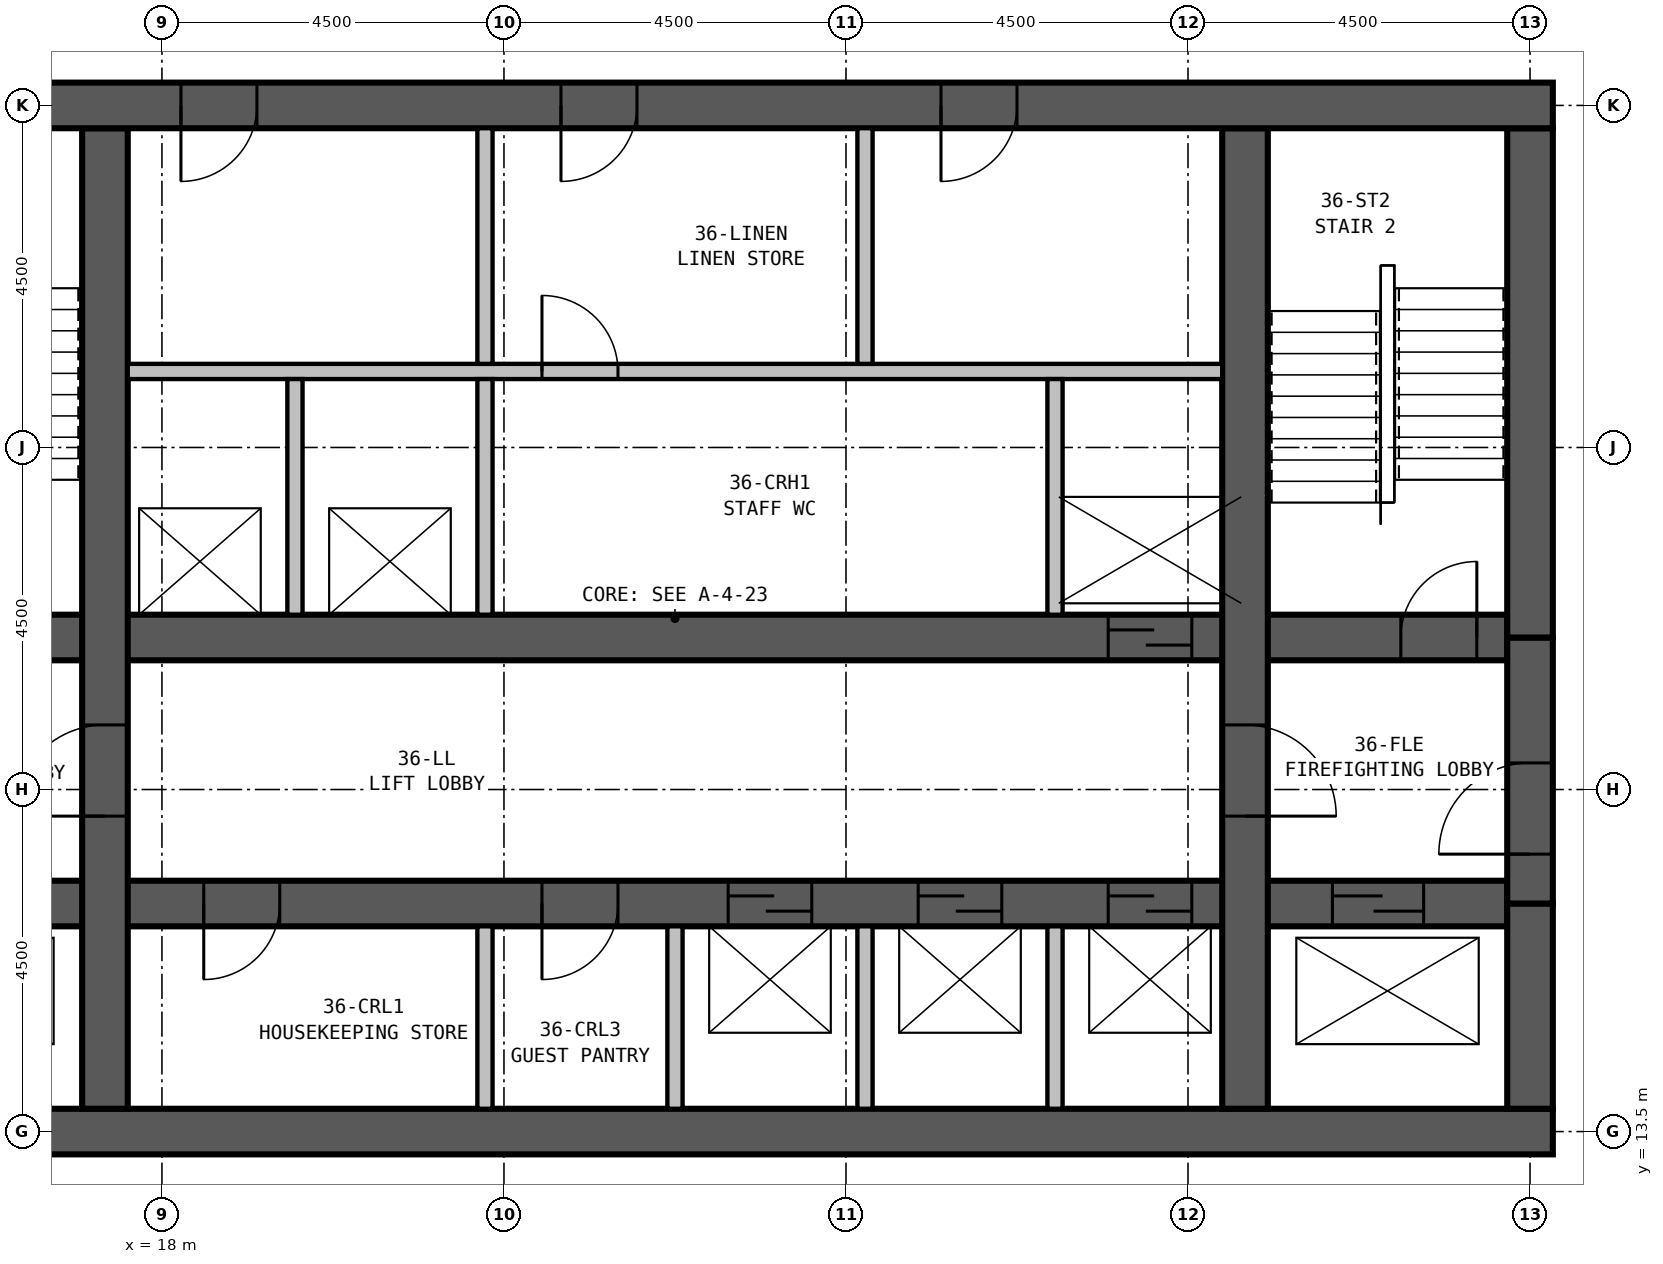
"""IFC4 building model, lengths in metres.
Left out: names, types, materials, properties, quantities, classifications, styles, units other than length and angle.
Written with IfcOpenShell. Run it as: python <this file> out.ifc"""

import sys

from ifc_helpers import new_model, si_unit, direction, frame, frame_2d, origin, place, context, subcontext, project, spatial, rectangle, extrude, element, fill, save


model = new_model("IFC4")
c1 = context("Model", 3, precision=1e-05, world=origin(), true_north=direction((0.0, 1.0)))
c2 = subcontext(c1, "Body", "Model", "MODEL_VIEW")
j1 = project(units=[si_unit("LENGTHUNIT", "METRE"), si_unit("PLANEANGLEUNIT", "RADIAN")], contexts=[c1])
p1 = place(None, origin())
s1 = spatial("IfcSite", under=j1, at=p1, CompositionType="ELEMENT")
p2 = place(p1, origin())
s2 = spatial("IfcBuilding", under=s1, at=p2, CompositionType="ELEMENT")
p3 = place(p2, frame((0.0, 0.0, 138.9)))
s3 = spatial("IfcBuildingStorey", under=s2, at=p3, CompositionType="ELEMENT", Elevation=138.9)
p4 = place(p3, frame((13.2, 13.5, 0.0), z_axis=(0.0, 0.0, 1.0), x_axis=(1.0, 0.0, 0.0)))
e1 = element("IfcWall", 1, at=p4, inside=s3, PredefinedType="SHEAR", context=c2, shape_type="SweptSolid", body=[
    extrude(rectangle(XDim=23.1, YDim=0.6, at=frame_2d((11.55, 0.0))), origin(), (0.0, 0.0, 1.0), 3.5),
])
p5 = place(p3, frame((36.3, 27.0, 0.0), z_axis=(0.0, 0.0, 1.0), x_axis=(-1.0, 0.0, 0.0)))
e2 = element("IfcWall", 2, at=p5, inside=s3, PredefinedType="SHEAR", context=c2, shape_type="SweptSolid", body=[
    extrude(rectangle(XDim=23.1, YDim=0.6, at=frame_2d((11.55, 0.0))), origin(), (0.0, 0.0, 1.0), 3.5),
])
p6 = place(p5, frame((17.05, 0.0, 0.0)))
e3 = element("IfcOpeningElement", 3, at=p6, cuts=e2, PredefinedType="OPENING", context=c2, shape_type="SweptSolid", body=[
    extrude(rectangle(XDim=1.0, YDim=2.1, at=frame_2d((0.5, 1.05))), frame((0.0, 0.31, 0.0), z_axis=(0.0, -1.0, 0.0), x_axis=(1.0, 0.0, 0.0)), (0.0, 0.0, 1.0), 0.62),
])
p7 = place(p5, frame((12.05, 0.0, 0.0)))
e4 = element("IfcOpeningElement", 4, at=p7, cuts=e2, PredefinedType="OPENING", context=c2, shape_type="SweptSolid", body=[
    extrude(rectangle(XDim=1.0, YDim=2.1, at=frame_2d((0.5, 1.05))), frame((0.0, 0.31, 0.0), z_axis=(0.0, -1.0, 0.0), x_axis=(1.0, 0.0, 0.0)), (0.0, 0.0, 1.0), 0.62),
])
p8 = place(p5, frame((7.05, 0.0, 0.0)))
e5 = element("IfcOpeningElement", 5, at=p8, cuts=e2, PredefinedType="OPENING", context=c2, shape_type="SweptSolid", body=[
    extrude(rectangle(XDim=1.0, YDim=2.1, at=frame_2d((0.5, 1.05))), frame((0.0, 0.31, 0.0), z_axis=(0.0, -1.0, 0.0), x_axis=(1.0, 0.0, 0.0)), (0.0, 0.0, 1.0), 0.62),
])
p9 = place(p3, frame((17.25, 13.8, 0.0), z_axis=(0.0, 0.0, 1.0), x_axis=(0.0, 1.0, 0.0)))
e6 = element("IfcWall", 6, at=p9, inside=s3, PredefinedType="SHEAR", context=c2, shape_type="SweptSolid", body=[
    extrude(rectangle(XDim=12.9, YDim=0.6, at=frame_2d((6.45, 0.0))), origin(), (0.0, 0.0, 1.0), 3.5),
])
p10 = place(p9, frame((3.85, 0.0, 0.0)))
e7 = element("IfcOpeningElement", 7, at=p10, cuts=e6, PredefinedType="OPENING", context=c2, shape_type="SweptSolid", body=[
    extrude(rectangle(XDim=1.2, YDim=2.1, at=frame_2d((0.6, 1.05))), frame((0.0, 0.31, 0.0), z_axis=(0.0, -1.0, 0.0), x_axis=(1.0, 0.0, 0.0)), (0.0, 0.0, 1.0), 0.62),
])
p11 = place(p3, frame((32.25, 13.8, 0.0), z_axis=(0.0, 0.0, 1.0), x_axis=(0.0, 1.0, 0.0)))
e8 = element("IfcWall", 8, at=p11, inside=s3, PredefinedType="SHEAR", context=c2, shape_type="SweptSolid", body=[
    extrude(rectangle(XDim=12.9, YDim=0.6, at=frame_2d((6.45, 0.0))), origin(), (0.0, 0.0, 1.0), 3.5),
])
p12 = place(p11, frame((5.05, 0.0, 0.0), z_axis=(0.0, 0.0, 1.0), x_axis=(-1.0, 0.0, 0.0)))
e9 = element("IfcOpeningElement", 9, at=p12, cuts=e8, PredefinedType="OPENING", context=c2, shape_type="SweptSolid", body=[
    extrude(rectangle(XDim=1.2, YDim=2.1, at=frame_2d((0.6, 1.05))), frame((0.0, 0.31, 0.0), z_axis=(0.0, -1.0, 0.0), x_axis=(1.0, 0.0, 0.0)), (0.0, 0.0, 1.0), 0.62),
])
p13 = place(p3, frame((13.8, 16.5, 0.0), z_axis=(0.0, 0.0, 1.0), x_axis=(1.0, 0.0, 0.0)))
e10 = element("IfcWall", 10, at=p13, inside=s3, PredefinedType="SHEAR", context=c2, shape_type="SweptSolid", body=[
    extrude(rectangle(XDim=21.9, YDim=0.6, at=frame_2d((10.95, 0.0))), origin(), (0.0, 0.0, 1.0), 3.5),
])
p14 = place(p13, frame((11.65, 0.0, 0.0)))
e11 = element("IfcOpeningElement", 11, at=p14, cuts=e10, PredefinedType="OPENING", context=c2, shape_type="SweptSolid", body=[
    extrude(rectangle(XDim=1.1, YDim=2.1, at=frame_2d((0.55, 1.05))), frame((0.0, 0.31, 0.0), z_axis=(0.0, -1.0, 0.0), x_axis=(1.0, 0.0, 0.0)), (0.0, 0.0, 1.0), 0.62),
])
p15 = place(p13, frame((14.15, 0.0, 0.0)))
e12 = element("IfcOpeningElement", 12, at=p15, cuts=e10, PredefinedType="OPENING", context=c2, shape_type="SweptSolid", body=[
    extrude(rectangle(XDim=1.1, YDim=2.1, at=frame_2d((0.55, 1.05))), frame((0.0, 0.31, 0.0), z_axis=(0.0, -1.0, 0.0), x_axis=(1.0, 0.0, 0.0)), (0.0, 0.0, 1.0), 0.62),
])
p16 = place(p13, frame((16.65, 0.0, 0.0)))
e13 = element("IfcOpeningElement", 13, at=p16, cuts=e10, PredefinedType="OPENING", context=c2, shape_type="SweptSolid", body=[
    extrude(rectangle(XDim=1.1, YDim=2.1, at=frame_2d((0.55, 1.05))), frame((0.0, 0.31, 0.0), z_axis=(0.0, -1.0, 0.0), x_axis=(1.0, 0.0, 0.0)), (0.0, 0.0, 1.0), 0.62),
])
p17 = place(p13, frame((5.75, 0.0, 0.0), z_axis=(0.0, 0.0, 1.0), x_axis=(-1.0, 0.0, 0.0)))
e14 = element("IfcOpeningElement", 14, at=p17, cuts=e10, PredefinedType="OPENING", context=c2, shape_type="SweptSolid", body=[
    extrude(rectangle(XDim=1.0, YDim=2.1, at=frame_2d((0.5, 1.05))), frame((0.0, 0.31, 0.0), z_axis=(0.0, -1.0, 0.0), x_axis=(1.0, 0.0, 0.0)), (0.0, 0.0, 1.0), 0.62),
])
p18 = place(p13, frame((10.2, 0.0, 0.0), z_axis=(0.0, 0.0, 1.0), x_axis=(-1.0, 0.0, 0.0)))
e15 = element("IfcOpeningElement", 15, at=p18, cuts=e10, PredefinedType="OPENING", context=c2, shape_type="SweptSolid", body=[
    extrude(rectangle(XDim=1.0, YDim=2.1, at=frame_2d((0.5, 1.05))), frame((0.0, 0.31, 0.0), z_axis=(0.0, -1.0, 0.0), x_axis=(1.0, 0.0, 0.0)), (0.0, 0.0, 1.0), 0.62),
])
p19 = place(p13, frame((0.6, 0.0, 0.0)))
e16 = element("IfcOpeningElement", 16, at=p19, cuts=e10, PredefinedType="OPENING", context=c2, shape_type="SweptSolid", body=[
    extrude(rectangle(XDim=1.2, YDim=2.1, at=frame_2d((0.6, 1.05))), frame((0.0, 0.31, 0.0), z_axis=(0.0, -1.0, 0.0), x_axis=(1.0, 0.0, 0.0)), (0.0, 0.0, 1.0), 0.62),
])
p20 = place(p13, frame((19.6, 0.0, 0.0)))
e17 = element("IfcOpeningElement", 17, at=p20, cuts=e10, PredefinedType="OPENING", context=c2, shape_type="SweptSolid", body=[
    extrude(rectangle(XDim=1.2, YDim=2.1, at=frame_2d((0.6, 1.05))), frame((0.0, 0.31, 0.0), z_axis=(0.0, -1.0, 0.0), x_axis=(1.0, 0.0, 0.0)), (0.0, 0.0, 1.0), 0.62),
])
p21 = place(p3, frame((13.8, 20.0, 0.0), z_axis=(0.0, 0.0, 1.0), x_axis=(1.0, 0.0, 0.0)))
e18 = element("IfcWall", 18, at=p21, inside=s3, PredefinedType="SHEAR", context=c2, shape_type="SweptSolid", body=[
    extrude(rectangle(XDim=21.9, YDim=0.6, at=frame_2d((10.95, 0.0))), origin(), (0.0, 0.0, 1.0), 3.5),
])
p22 = place(p21, frame((0.5, 0.0, 0.0)))
e19 = element("IfcOpeningElement", 19, at=p22, cuts=e18, PredefinedType="OPENING", context=c2, shape_type="SweptSolid", body=[
    extrude(rectangle(XDim=1.0, YDim=2.1, at=frame_2d((0.5, 1.05))), frame((0.0, 0.31, 0.0), z_axis=(0.0, -1.0, 0.0), x_axis=(1.0, 0.0, 0.0)), (0.0, 0.0, 1.0), 0.62),
])
p23 = place(p21, frame((20.5, 0.0, 0.0)))
e20 = element("IfcOpeningElement", 20, at=p23, cuts=e18, PredefinedType="OPENING", context=c2, shape_type="SweptSolid", body=[
    extrude(rectangle(XDim=1.0, YDim=2.1, at=frame_2d((0.5, 1.05))), frame((0.0, 0.31, 0.0), z_axis=(0.0, -1.0, 0.0), x_axis=(1.0, 0.0, 0.0)), (0.0, 0.0, 1.0), 0.62),
])
p24 = place(p21, frame((16.65, 0.0, 0.0)))
e21 = element("IfcOpeningElement", 21, at=p24, cuts=e18, PredefinedType="OPENING", context=c2, shape_type="SweptSolid", body=[
    extrude(rectangle(XDim=1.1, YDim=2.1, at=frame_2d((0.55, 1.05))), frame((0.0, 0.31, 0.0), z_axis=(0.0, -1.0, 0.0), x_axis=(1.0, 0.0, 0.0)), (0.0, 0.0, 1.0), 0.62),
])
p25 = place(p3, frame((36.0, 13.8, 0.0), z_axis=(0.0, 0.0, 1.0), x_axis=(0.0, 1.0, 0.0)))
e22 = element("IfcWall", 22, at=p25, inside=s3, PredefinedType="SHEAR", context=c2, shape_type="SweptSolid", body=[
    extrude(rectangle(XDim=2.7, YDim=0.6, at=frame_2d((1.35, 0.0))), origin(), (0.0, 0.0, 1.0), 3.5),
])
p26 = place(p3, frame((36.0, 16.5, 0.0), z_axis=(0.0, 0.0, 1.0), x_axis=(0.0, 1.0, 0.0)))
e23 = element("IfcWall", 23, at=p26, inside=s3, PredefinedType="SHEAR", context=c2, shape_type="SweptSolid", body=[
    extrude(rectangle(XDim=3.5, YDim=0.6, at=frame_2d((1.75, 0.0))), origin(), (0.0, 0.0, 1.0), 3.5),
])
p27 = place(p26, frame((0.65, 0.0, 0.0)))
e24 = element("IfcOpeningElement", 24, at=p27, cuts=e23, PredefinedType="OPENING", context=c2, shape_type="SweptSolid", body=[
    extrude(rectangle(XDim=1.2, YDim=2.1, at=frame_2d((0.6, 1.05))), frame((0.0, 0.31, 0.0), z_axis=(0.0, -1.0, 0.0), x_axis=(1.0, 0.0, 0.0)), (0.0, 0.0, 1.0), 0.62),
])
p28 = place(p3, frame((36.0, 20.0, 0.0), z_axis=(0.0, 0.0, 1.0), x_axis=(0.0, 1.0, 0.0)))
e25 = element("IfcWall", 25, at=p28, inside=s3, PredefinedType="SHEAR", context=c2, shape_type="SweptSolid", body=[
    extrude(rectangle(XDim=6.7, YDim=0.6, at=frame_2d((3.35, 0.0))), origin(), (0.0, 0.0, 1.0), 3.5),
])
p29 = place(p3, frame((19.75, 20.3, 0.0), z_axis=(0.0, 0.0, 1.0), x_axis=(0.0, 1.0, 0.0)))
e26 = element("IfcWall", 26, at=p29, inside=s3, PredefinedType="PARTITIONING", context=c2, shape_type="SweptSolid", body=[
    extrude(rectangle(XDim=3.1, YDim=0.2, at=frame_2d((1.55, 0.0))), origin(), (0.0, 0.0, 1.0), 3.25),
])
p30 = place(p3, frame((22.25, 13.8, 0.0), z_axis=(0.0, 0.0, 1.0), x_axis=(0.0, 1.0, 0.0)))
e27 = element("IfcWall", 27, at=p30, inside=s3, PredefinedType="PARTITIONING", context=c2, shape_type="SweptSolid", body=[
    extrude(rectangle(XDim=2.4, YDim=0.2, at=frame_2d((1.2, 0.0))), origin(), (0.0, 0.0, 1.0), 3.25),
])
p31 = place(p3, frame((22.25, 20.3, 0.0), z_axis=(0.0, 0.0, 1.0), x_axis=(0.0, 1.0, 0.0)))
e28 = element("IfcWall", 28, at=p31, inside=s3, PredefinedType="PARTITIONING", context=c2, shape_type="SweptSolid", body=[
    extrude(rectangle(XDim=3.1, YDim=0.2, at=frame_2d((1.55, 0.0))), origin(), (0.0, 0.0, 1.0), 3.25),
])
for number, where, z_axis, x_axis in (
    (29, (24.75, 13.8, 0.0), (0.0, 0.0, 1.0), (0.0, 1.0, 0.0)),
    (30, (27.25, 13.8, 0.0), (0.0, 0.0, 1.0), (0.0, 1.0, 0.0)),
    (31, (29.75, 13.8, 0.0), (0.0, 0.0, 1.0), (0.0, 1.0, 0.0)),
):
    element("IfcWall", number, at=place(p3, frame(where, z_axis=z_axis, x_axis=x_axis)), inside=s3, PredefinedType="PARTITIONING", context=c2, shape_type="SweptSolid", body=[
        extrude(rectangle(XDim=2.4, YDim=0.2, at=frame_2d((1.2, 0.0))), origin(), (0.0, 0.0, 1.0), 3.25),
    ])
p32 = place(p3, frame((29.75, 20.3, 0.0), z_axis=(0.0, 0.0, 1.0), x_axis=(0.0, 1.0, 0.0)))
e32 = element("IfcWall", 32, at=p32, inside=s3, PredefinedType="PARTITIONING", context=c2, shape_type="SweptSolid", body=[
    extrude(rectangle(XDim=3.1, YDim=0.2, at=frame_2d((1.55, 0.0))), origin(), (0.0, 0.0, 1.0), 3.25),
])
p33 = place(p3, frame((17.55, 23.5, 0.0), z_axis=(0.0, 0.0, 1.0), x_axis=(1.0, 0.0, 0.0)))
e33 = element("IfcWall", 33, at=p33, inside=s3, PredefinedType="PARTITIONING", context=c2, shape_type="SweptSolid", body=[
    extrude(rectangle(XDim=14.4, YDim=0.2, at=frame_2d((7.2, 0.0))), origin(), (0.0, 0.0, 1.0), 3.25),
])
p34 = place(p33, frame((5.45, 0.0, 0.0)))
e34 = element("IfcOpeningElement", 34, at=p34, cuts=e33, PredefinedType="OPENING", context=c2, shape_type="SweptSolid", body=[
    extrude(rectangle(XDim=1.0, YDim=2.1, at=frame_2d((0.5, 1.05))), frame((0.0, 0.11, 0.0), z_axis=(0.0, -1.0, 0.0), x_axis=(1.0, 0.0, 0.0)), (0.0, 0.0, 1.0), 0.22),
])
for number, where, z_axis, x_axis in (
    (35, (22.25, 23.6, 0.0), (0.0, 0.0, 1.0), (0.0, 1.0, 0.0)),
    (36, (27.25, 23.6, 0.0), (0.0, 0.0, 1.0), (0.0, 1.0, 0.0)),
):
    element("IfcWall", number, at=place(p3, frame(where, z_axis=z_axis, x_axis=x_axis)), inside=s3, PredefinedType="PARTITIONING", context=c2, shape_type="SweptSolid", body=[
        extrude(rectangle(XDim=3.1, YDim=0.2, at=frame_2d((1.55, 0.0))), origin(), (0.0, 0.0, 1.0), 3.25),
    ])
p35 = place(p34, origin())
e37 = element("IfcDoor", 37, at=p35, inside=s3, OperationType="SINGLE_SWING_LEFT", PredefinedType="DOOR", context=c2, shape_type="SweptSolid", body=[
    extrude(rectangle(XDim=1.0, YDim=2.1, at=frame_2d((0.5, 1.05))), frame((0.0, 0.025, 0.0), z_axis=(0.0, -1.0, 0.0), x_axis=(1.0, 0.0, 0.0)), (0.0, 0.0, 1.0), 0.05),
])
fill(e34, e37)
p36 = place(p27, origin())
e38 = element("IfcDoor", 38, at=p36, inside=s3, OperationType="SINGLE_SWING_LEFT", PredefinedType="DOOR", context=c2, shape_type="SweptSolid", body=[
    extrude(rectangle(XDim=1.2, YDim=2.1, at=frame_2d((0.6, 1.05))), frame((0.0, 0.3, 0.0), z_axis=(0.0, -1.0, 0.0), x_axis=(1.0, 0.0, 0.0)), (0.0, 0.0, 1.0), 0.6),
])
fill(e24, e38)
p37 = place(p10, origin())
e39 = element("IfcDoor", 39, at=p37, inside=s3, OperationType="SINGLE_SWING_LEFT", PredefinedType="DOOR", context=c2, shape_type="SweptSolid", body=[
    extrude(rectangle(XDim=1.2, YDim=2.1, at=frame_2d((0.6, 1.05))), frame((0.0, 0.3, 0.0), z_axis=(0.0, -1.0, 0.0), x_axis=(1.0, 0.0, 0.0)), (0.0, 0.0, 1.0), 0.6),
])
fill(e7, e39)
p38 = place(p12, origin())
e40 = element("IfcDoor", 40, at=p38, inside=s3, OperationType="SINGLE_SWING_RIGHT", PredefinedType="DOOR", context=c2, shape_type="SweptSolid", body=[
    extrude(rectangle(XDim=1.2, YDim=2.1, at=frame_2d((0.6, 1.05))), frame((0.0, 0.3, 0.0), z_axis=(0.0, -1.0, 0.0), x_axis=(1.0, 0.0, 0.0)), (0.0, 0.0, 1.0), 0.6),
])
fill(e9, e40)
p39 = place(p23, origin())
e41 = element("IfcDoor", 41, at=p39, inside=s3, OperationType="SINGLE_SWING_RIGHT", PredefinedType="DOOR", context=c2, shape_type="SweptSolid", body=[
    extrude(rectangle(XDim=1.0, YDim=2.1, at=frame_2d((0.5, 1.05))), frame((0.0, 0.3, 0.0), z_axis=(0.0, -1.0, 0.0), x_axis=(1.0, 0.0, 0.0)), (0.0, 0.0, 1.0), 0.6),
])
fill(e20, e41)
p40 = place(p14, origin())
e42 = element("IfcDoor", 42, at=p40, inside=s3, OperationType="SLIDING_TO_LEFT", PredefinedType="DOOR", context=c2, shape_type="SweptSolid", body=[
    extrude(rectangle(XDim=1.1, YDim=2.1, at=frame_2d((0.55, 1.05))), frame((0.0, 0.3, 0.0), z_axis=(0.0, -1.0, 0.0), x_axis=(1.0, 0.0, 0.0)), (0.0, 0.0, 1.0), 0.6),
])
fill(e11, e42)
p41 = place(p15, origin())
e43 = element("IfcDoor", 43, at=p41, inside=s3, OperationType="SLIDING_TO_LEFT", PredefinedType="DOOR", context=c2, shape_type="SweptSolid", body=[
    extrude(rectangle(XDim=1.1, YDim=2.1, at=frame_2d((0.55, 1.05))), frame((0.0, 0.3, 0.0), z_axis=(0.0, -1.0, 0.0), x_axis=(1.0, 0.0, 0.0)), (0.0, 0.0, 1.0), 0.6),
])
fill(e12, e43)
p42 = place(p16, origin())
e44 = element("IfcDoor", 44, at=p42, inside=s3, OperationType="SLIDING_TO_LEFT", PredefinedType="DOOR", context=c2, shape_type="SweptSolid", body=[
    extrude(rectangle(XDim=1.1, YDim=2.1, at=frame_2d((0.55, 1.05))), frame((0.0, 0.3, 0.0), z_axis=(0.0, -1.0, 0.0), x_axis=(1.0, 0.0, 0.0)), (0.0, 0.0, 1.0), 0.6),
])
fill(e13, e44)
p43 = place(p24, origin())
e45 = element("IfcDoor", 45, at=p43, inside=s3, OperationType="SLIDING_TO_LEFT", PredefinedType="DOOR", context=c2, shape_type="SweptSolid", body=[
    extrude(rectangle(XDim=1.1, YDim=2.1, at=frame_2d((0.55, 1.05))), frame((0.0, 0.3, 0.0), z_axis=(0.0, -1.0, 0.0), x_axis=(1.0, 0.0, 0.0)), (0.0, 0.0, 1.0), 0.6),
])
fill(e21, e45)
p44 = place(p17, origin())
e46 = element("IfcDoor", 46, at=p44, inside=s3, OperationType="SINGLE_SWING_RIGHT", PredefinedType="DOOR", context=c2, shape_type="SweptSolid", body=[
    extrude(rectangle(XDim=1.0, YDim=2.1, at=frame_2d((0.5, 1.05))), frame((0.0, 0.3, 0.0), z_axis=(0.0, -1.0, 0.0), x_axis=(1.0, 0.0, 0.0)), (0.0, 0.0, 1.0), 0.6),
])
fill(e14, e46)
p45 = place(p18, origin())
e47 = element("IfcDoor", 47, at=p45, inside=s3, OperationType="SINGLE_SWING_RIGHT", PredefinedType="DOOR", context=c2, shape_type="SweptSolid", body=[
    extrude(rectangle(XDim=1.0, YDim=2.1, at=frame_2d((0.5, 1.05))), frame((0.0, 0.3, 0.0), z_axis=(0.0, -1.0, 0.0), x_axis=(1.0, 0.0, 0.0)), (0.0, 0.0, 1.0), 0.6),
])
fill(e15, e47)
p46 = place(p20, origin())
e48 = element("IfcDoor", 48, at=p46, inside=s3, OperationType="SLIDING_TO_LEFT", PredefinedType="DOOR", context=c2, shape_type="SweptSolid", body=[
    extrude(rectangle(XDim=1.2, YDim=2.1, at=frame_2d((0.6, 1.05))), frame((0.0, 0.3, 0.0), z_axis=(0.0, -1.0, 0.0), x_axis=(1.0, 0.0, 0.0)), (0.0, 0.0, 1.0), 0.6),
])
fill(e17, e48)
p47 = place(p6, origin())
e49 = element("IfcDoor", 49, at=p47, inside=s3, OperationType="SINGLE_SWING_RIGHT", PredefinedType="DOOR", context=c2, shape_type="SweptSolid", body=[
    extrude(rectangle(XDim=1.0, YDim=2.1, at=frame_2d((0.5, 1.05))), frame((0.0, 0.3, 0.0), z_axis=(0.0, -1.0, 0.0), x_axis=(1.0, 0.0, 0.0)), (0.0, 0.0, 1.0), 0.6),
])
fill(e3, e49)
p48 = place(p7, origin())
e50 = element("IfcDoor", 50, at=p48, inside=s3, OperationType="SINGLE_SWING_RIGHT", PredefinedType="DOOR", context=c2, shape_type="SweptSolid", body=[
    extrude(rectangle(XDim=1.0, YDim=2.1, at=frame_2d((0.5, 1.05))), frame((0.0, 0.3, 0.0), z_axis=(0.0, -1.0, 0.0), x_axis=(1.0, 0.0, 0.0)), (0.0, 0.0, 1.0), 0.6),
])
fill(e4, e50)
p49 = place(p8, origin())
e51 = element("IfcDoor", 51, at=p49, inside=s3, OperationType="SINGLE_SWING_RIGHT", PredefinedType="DOOR", context=c2, shape_type="SweptSolid", body=[
    extrude(rectangle(XDim=1.0, YDim=2.1, at=frame_2d((0.5, 1.05))), frame((0.0, 0.3, 0.0), z_axis=(0.0, -1.0, 0.0), x_axis=(1.0, 0.0, 0.0)), (0.0, 0.0, 1.0), 0.6),
])
fill(e5, e51)
save(model, sys.argv[1])
